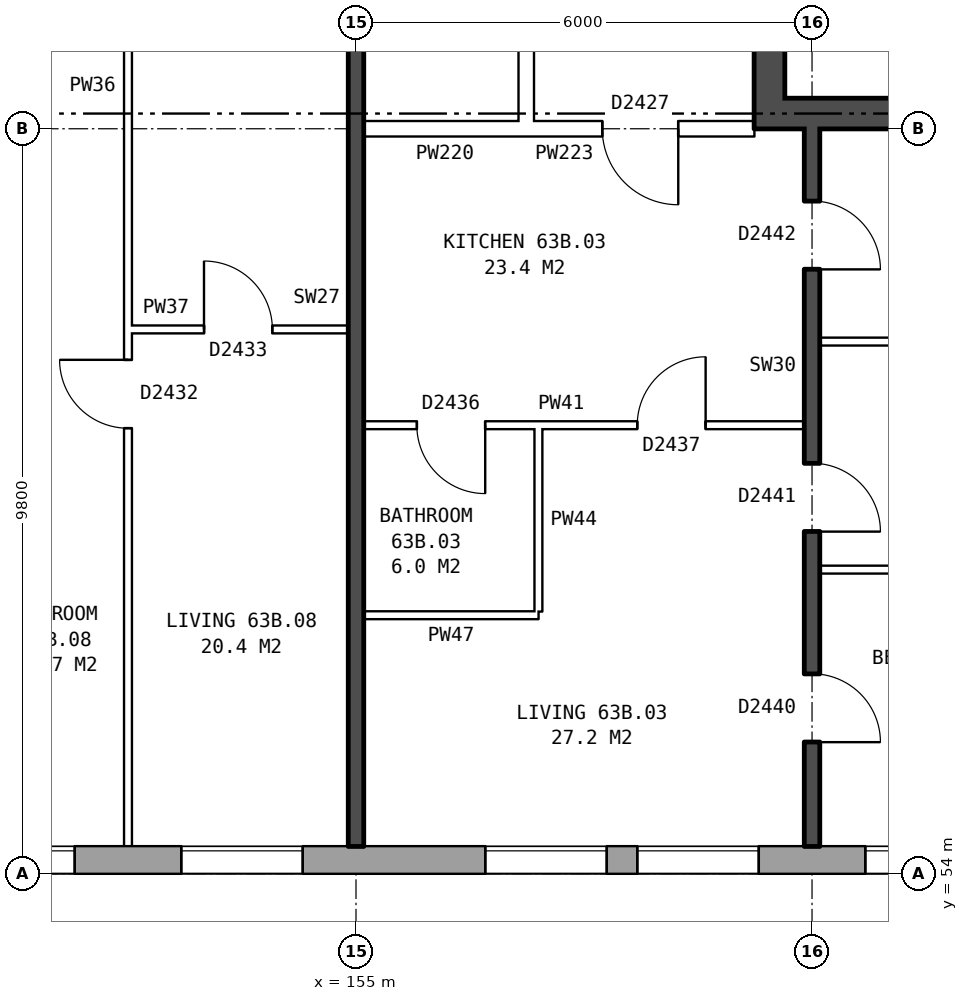
"""IFC4 building model, lengths in metres.
Left out: names, types, materials, properties, quantities, classifications, styles, units other than length and angle.
Written with IfcOpenShell. Run it as: python <this file> out.ifc"""

import sys

from ifc_helpers import new_model, si_unit, direction, frame, frame_2d, origin, place, context, subcontext, project, spatial, rectangle, extrude, element, fill, save


model = new_model("IFC4")
c1 = context("Model", 3, precision=1e-05, world=origin(), true_north=direction((0.0, 1.0)))
c2 = subcontext(c1, "Body", "Model", "MODEL_VIEW")
j1 = project(units=[si_unit("LENGTHUNIT", "METRE"), si_unit("PLANEANGLEUNIT", "RADIAN")], contexts=[c1])
p1 = place(None, origin())
s1 = spatial("IfcSite", under=j1, at=p1, CompositionType="ELEMENT")
p2 = place(p1, origin())
s2 = spatial("IfcBuilding", under=s1, at=p2, CompositionType="ELEMENT")
p3 = place(p2, frame((0.0, 0.0, 224.5)))
s3 = spatial("IfcBuildingStorey", under=s2, at=p3, CompositionType="ELEMENT", Elevation=224.5)
p4 = place(p3, frame((132.05, 54.18, 0.0), z_axis=(0.0, 0.0, 1.0), x_axis=(1.0, 0.0, 0.0)))
e1 = element("IfcWall", 1, at=p4, inside=s3, PredefinedType="STANDARD", context=c2, shape_type="SweptSolid", body=[
    extrude(rectangle(XDim=33.875, YDim=0.36, at=frame_2d((16.938, 0.0))), origin(), (0.0, 0.0, 1.0), 2.85),
])
p5 = place(p4, frame((2.65, 0.0, 0.8)))
e2 = element("IfcOpeningElement", 2, at=p5, cuts=e1, PredefinedType="OPENING", context=c2, shape_type="SweptSolid", body=[
    extrude(rectangle(XDim=1.6, YDim=1.8, at=frame_2d((0.8, 0.9))), frame((0.0, 0.19, 0.0), z_axis=(0.0, -1.0, 0.0), x_axis=(1.0, 0.0, 0.0)), (0.0, 0.0, 1.0), 0.38),
])
p6 = place(p4, frame((5.65, 0.0, 0.8)))
e3 = element("IfcOpeningElement", 3, at=p6, cuts=e1, PredefinedType="OPENING", context=c2, shape_type="SweptSolid", body=[
    extrude(rectangle(XDim=1.6, YDim=1.8, at=frame_2d((0.8, 0.9))), frame((0.0, 0.19, 0.0), z_axis=(0.0, -1.0, 0.0), x_axis=(1.0, 0.0, 0.0)), (0.0, 0.0, 1.0), 0.38),
])
p7 = place(p4, frame((8.65, 0.0, 0.8)))
e4 = element("IfcOpeningElement", 4, at=p7, cuts=e1, PredefinedType="OPENING", context=c2, shape_type="SweptSolid", body=[
    extrude(rectangle(XDim=1.6, YDim=1.8, at=frame_2d((0.8, 0.9))), frame((0.0, 0.19, 0.0), z_axis=(0.0, -1.0, 0.0), x_axis=(1.0, 0.0, 0.0)), (0.0, 0.0, 1.0), 0.38),
])
p8 = place(p4, frame((11.15, 0.0, 1.7)))
e5 = element("IfcOpeningElement", 5, at=p8, cuts=e1, PredefinedType="OPENING", context=c2, shape_type="SweptSolid", body=[
    extrude(rectangle(XDim=0.6, YDim=0.9, at=frame_2d((0.3, 0.45))), frame((0.0, 0.19, 0.0), z_axis=(0.0, -1.0, 0.0), x_axis=(1.0, 0.0, 0.0)), (0.0, 0.0, 1.0), 0.38),
])
p9 = place(p4, frame((14.65, 0.0, 0.8)))
e6 = element("IfcOpeningElement", 6, at=p9, cuts=e1, PredefinedType="OPENING", context=c2, shape_type="SweptSolid", body=[
    extrude(rectangle(XDim=1.6, YDim=1.8, at=frame_2d((0.8, 0.9))), frame((0.0, 0.19, 0.0), z_axis=(0.0, -1.0, 0.0), x_axis=(1.0, 0.0, 0.0)), (0.0, 0.0, 1.0), 0.38),
])
p10 = place(p4, frame((17.65, 0.0, 0.8)))
e7 = element("IfcOpeningElement", 7, at=p10, cuts=e1, PredefinedType="OPENING", context=c2, shape_type="SweptSolid", body=[
    extrude(rectangle(XDim=1.6, YDim=1.8, at=frame_2d((0.8, 0.9))), frame((0.0, 0.19, 0.0), z_axis=(0.0, -1.0, 0.0), x_axis=(1.0, 0.0, 0.0)), (0.0, 0.0, 1.0), 0.38),
])
p11 = place(p4, frame((20.65, 0.0, 0.8)))
e8 = element("IfcOpeningElement", 8, at=p11, cuts=e1, PredefinedType="OPENING", context=c2, shape_type="SweptSolid", body=[
    extrude(rectangle(XDim=1.6, YDim=1.8, at=frame_2d((0.8, 0.9))), frame((0.0, 0.19, 0.0), z_axis=(0.0, -1.0, 0.0), x_axis=(1.0, 0.0, 0.0)), (0.0, 0.0, 1.0), 0.38),
])
p12 = place(p4, frame((24.65, 0.0, 0.8)))
e9 = element("IfcOpeningElement", 9, at=p12, cuts=e1, PredefinedType="OPENING", context=c2, shape_type="SweptSolid", body=[
    extrude(rectangle(XDim=1.6, YDim=1.8, at=frame_2d((0.8, 0.9))), frame((0.0, 0.19, 0.0), z_axis=(0.0, -1.0, 0.0), x_axis=(1.0, 0.0, 0.0)), (0.0, 0.0, 1.0), 0.38),
])
p13 = place(p4, frame((26.65, 0.0, 0.8)))
e10 = element("IfcOpeningElement", 10, at=p13, cuts=e1, PredefinedType="OPENING", context=c2, shape_type="SweptSolid", body=[
    extrude(rectangle(XDim=1.6, YDim=1.8, at=frame_2d((0.8, 0.9))), frame((0.0, 0.19, 0.0), z_axis=(0.0, -1.0, 0.0), x_axis=(1.0, 0.0, 0.0)), (0.0, 0.0, 1.0), 0.38),
])
p14 = place(p4, frame((29.65, 0.0, 0.8)))
e11 = element("IfcOpeningElement", 11, at=p14, cuts=e1, PredefinedType="OPENING", context=c2, shape_type="SweptSolid", body=[
    extrude(rectangle(XDim=1.6, YDim=1.8, at=frame_2d((0.8, 0.9))), frame((0.0, 0.19, 0.0), z_axis=(0.0, -1.0, 0.0), x_axis=(1.0, 0.0, 0.0)), (0.0, 0.0, 1.0), 0.38),
])
p15 = place(p4, frame((13.2, 0.0, 0.8)))
e12 = element("IfcOpeningElement", 12, at=p15, cuts=e1, PredefinedType="OPENING", context=c2, shape_type="SweptSolid", body=[
    extrude(rectangle(XDim=0.6, YDim=1.5, at=frame_2d((0.3, 0.75))), frame((0.0, 0.19, 0.0), z_axis=(0.0, -1.0, 0.0), x_axis=(1.0, 0.0, 0.0)), (0.0, 0.0, 1.0), 0.38),
])
p16 = place(p3, frame((160.44, 76.2, 0.0), z_axis=(0.0, 0.0, 1.0), x_axis=(0.0, -1.0, 0.0)))
e13 = element("IfcWall", 13, at=p16, inside=s3, PredefinedType="SHEAR", context=c2, shape_type="SweptSolid", body=[
    extrude(rectangle(XDim=12.4, YDim=0.4, at=frame_2d((6.2, 0.0))), origin(), (0.0, 0.0, 1.0), 2.85),
])
p17 = place(p16, frame((1.325, 0.0, 0.0)))
e14 = element("IfcOpeningElement", 14, at=p17, cuts=e13, PredefinedType="OPENING", context=c2, shape_type="SweptSolid", body=[
    extrude(rectangle(XDim=1.1, YDim=2.1, at=frame_2d((0.55, 1.05))), frame((0.0, 0.21, 0.0), z_axis=(0.0, -1.0, 0.0), x_axis=(1.0, 0.0, 0.0)), (0.0, 0.0, 1.0), 0.42),
])
p18 = place(p16, frame((3.625, 0.0, 0.0)))
e15 = element("IfcOpeningElement", 15, at=p18, cuts=e13, PredefinedType="OPENING", context=c2, shape_type="SweptSolid", body=[
    extrude(rectangle(XDim=0.85, YDim=2.1, at=frame_2d((0.425, 1.05))), frame((0.0, 0.21, 0.0), z_axis=(0.0, -1.0, 0.0), x_axis=(1.0, 0.0, 0.0)), (0.0, 0.0, 1.0), 0.42),
])
p19 = place(p16, frame((5.775, 0.0, 0.0)))
e16 = element("IfcOpeningElement", 16, at=p19, cuts=e13, PredefinedType="OPENING", context=c2, shape_type="SweptSolid", body=[
    extrude(rectangle(XDim=0.85, YDim=2.1, at=frame_2d((0.425, 1.05))), frame((0.0, 0.21, 0.0), z_axis=(0.0, -1.0, 0.0), x_axis=(1.0, 0.0, 0.0)), (0.0, 0.0, 1.0), 0.42),
])
p20 = place(p16, frame((9.9, 0.0, 0.0)))
e17 = element("IfcOpeningElement", 17, at=p20, cuts=e13, PredefinedType="OPENING", context=c2, shape_type="SweptSolid", body=[
    extrude(rectangle(XDim=1.1, YDim=2.1, at=frame_2d((0.55, 1.05))), frame((0.0, 0.21, 0.0), z_axis=(0.0, -1.0, 0.0), x_axis=(1.0, 0.0, 0.0)), (0.0, 0.0, 1.0), 0.42),
])
p21 = place(p16, frame((8.125, 0.0, 0.0)))
e18 = element("IfcOpeningElement", 18, at=p21, cuts=e13, PredefinedType="OPENING", context=c2, shape_type="SweptSolid", body=[
    extrude(rectangle(XDim=0.85, YDim=2.1, at=frame_2d((0.425, 1.05))), frame((0.0, 0.21, 0.0), z_axis=(0.0, -1.0, 0.0), x_axis=(1.0, 0.0, 0.0)), (0.0, 0.0, 1.0), 0.42),
])
p22 = place(p3, frame((160.64, 64.0, 0.0), z_axis=(0.0, 0.0, 1.0), x_axis=(1.0, 0.0, 0.0)))
e19 = element("IfcWall", 19, at=p22, inside=s3, PredefinedType="SHEAR", context=c2, shape_type="SweptSolid", body=[
    extrude(rectangle(XDim=7.6, YDim=0.4, at=frame_2d((3.8, 0.0))), origin(), (0.0, 0.0, 1.0), 2.85),
])
p23 = place(p3, frame((157.24, 63.9, 0.0), z_axis=(0.0, 0.0, 1.0), x_axis=(0.0, 1.0, 0.0)))
e20 = element("IfcWall", 20, at=p23, inside=s3, PredefinedType="PARTITIONING", context=c2, shape_type="SweptSolid", body=[
    extrude(rectangle(XDim=12.2, YDim=0.2, at=frame_2d((6.1, 0.0))), origin(), (0.0, 0.0, 1.0), 2.85),
])
p24 = place(p23, frame((5.1, 0.0, 0.0)))
e21 = element("IfcOpeningElement", 21, at=p24, cuts=e20, PredefinedType="OPENING", context=c2, shape_type="SweptSolid", body=[
    extrude(rectangle(XDim=2.0, YDim=2.1, at=frame_2d((1.0, 1.05))), frame((0.0, 0.11, 0.0), z_axis=(0.0, -1.0, 0.0), x_axis=(1.0, 0.0, 0.0)), (0.0, 0.0, 1.0), 0.22),
])
p25 = place(p3, frame((155.1, 57.4, 0.0), z_axis=(0.0, 0.0, 1.0), x_axis=(1.0, 0.0, 0.0)))
e22 = element("IfcWall", 22, at=p25, inside=s3, PredefinedType="PARTITIONING", context=c2, shape_type="SweptSolid", body=[
    extrude(rectangle(XDim=2.3, YDim=0.1, at=frame_2d((1.15, 0.0))), origin(), (0.0, 0.0, 1.0), 2.85),
])
p26 = place(p3, frame((161.1, 58.0, 0.0), z_axis=(0.0, 0.0, 1.0), x_axis=(1.0, 0.0, 0.0)))
e23 = element("IfcWall", 23, at=p26, inside=s3, PredefinedType="PARTITIONING", context=c2, shape_type="SweptSolid", body=[
    extrude(rectangle(XDim=7.54, YDim=0.1, at=frame_2d((3.77, 0.0))), origin(), (0.0, 0.0, 1.0), 2.85),
])
p27 = place(p3, frame((155.1, 59.9, 0.0), z_axis=(0.0, 0.0, 1.0), x_axis=(1.0, 0.0, 0.0)))
e24 = element("IfcWall", 24, at=p27, inside=s3, PredefinedType="PARTITIONING", context=c2, shape_type="SweptSolid", body=[
    extrude(rectangle(XDim=5.8, YDim=0.1, at=frame_2d((2.9, 0.0))), origin(), (0.0, 0.0, 1.0), 2.85),
])
p28 = place(p27, frame((3.6, 0.0, 0.0)))
e25 = element("IfcOpeningElement", 25, at=p28, cuts=e24, PredefinedType="OPENING", context=c2, shape_type="SweptSolid", body=[
    extrude(rectangle(XDim=0.9, YDim=2.1, at=frame_2d((0.45, 1.05))), frame((0.0, 0.06, 0.0), z_axis=(0.0, -1.0, 0.0), x_axis=(1.0, 0.0, 0.0)), (0.0, 0.0, 1.0), 0.12),
])
p29 = place(p27, frame((0.7, 0.0, 0.0)))
e26 = element("IfcOpeningElement", 26, at=p29, cuts=e24, PredefinedType="OPENING", context=c2, shape_type="SweptSolid", body=[
    extrude(rectangle(XDim=0.9, YDim=2.1, at=frame_2d((0.45, 1.05))), frame((0.0, 0.06, 0.0), z_axis=(0.0, -1.0, 0.0), x_axis=(1.0, 0.0, 0.0)), (0.0, 0.0, 1.0), 0.12),
])
p30 = place(p3, frame((161.1, 61.0, 0.0), z_axis=(0.0, 0.0, 1.0), x_axis=(1.0, 0.0, 0.0)))
e27 = element("IfcWall", 27, at=p30, inside=s3, PredefinedType="PARTITIONING", context=c2, shape_type="SweptSolid", body=[
    extrude(rectangle(XDim=7.54, YDim=0.1, at=frame_2d((3.77, 0.0))), origin(), (0.0, 0.0, 1.0), 2.85),
])
p31 = place(p3, frame((152.0, 61.16, 0.0), z_axis=(0.0, 0.0, 1.0), x_axis=(1.0, 0.0, 0.0)))
e28 = element("IfcWall", 28, at=p31, inside=s3, PredefinedType="PARTITIONING", context=c2, shape_type="SweptSolid", body=[
    extrude(rectangle(XDim=2.9, YDim=0.1, at=frame_2d((1.45, 0.0))), origin(), (0.0, 0.0, 1.0), 2.85),
])
p32 = place(p31, frame((1.0, 0.0, 0.0)))
e29 = element("IfcOpeningElement", 29, at=p32, cuts=e28, PredefinedType="OPENING", context=c2, shape_type="SweptSolid", body=[
    extrude(rectangle(XDim=0.9, YDim=2.1, at=frame_2d((0.45, 1.05))), frame((0.0, 0.06, 0.0), z_axis=(0.0, -1.0, 0.0), x_axis=(1.0, 0.0, 0.0)), (0.0, 0.0, 1.0), 0.12),
])
p33 = place(p3, frame((155.1, 63.8, 0.0), z_axis=(0.0, 0.0, 1.0), x_axis=(1.0, 0.0, 0.0)))
e30 = element("IfcWall", 30, at=p33, inside=s3, PredefinedType="PARTITIONING", context=c2, shape_type="SweptSolid", body=[
    extrude(rectangle(XDim=2.14, YDim=0.2, at=frame_2d((1.07, 0.0))), origin(), (0.0, 0.0, 1.0), 2.85),
])
p34 = place(p3, frame((157.24, 63.8, 0.0), z_axis=(0.0, 0.0, 1.0), x_axis=(1.0, 0.0, 0.0)))
e31 = element("IfcWall", 31, at=p34, inside=s3, PredefinedType="PARTITIONING", context=c2, shape_type="SweptSolid", body=[
    extrude(rectangle(XDim=3.0, YDim=0.2, at=frame_2d((1.5, 0.0))), origin(), (0.0, 0.0, 1.0), 2.85),
])
p35 = place(p34, frame((1.0, 0.0, 0.0)))
e32 = element("IfcOpeningElement", 32, at=p35, cuts=e31, PredefinedType="OPENING", context=c2, shape_type="SweptSolid", body=[
    extrude(rectangle(XDim=1.0, YDim=2.1, at=frame_2d((0.5, 1.05))), frame((0.0, 0.11, 0.0), z_axis=(0.0, -1.0, 0.0), x_axis=(1.0, 0.0, 0.0)), (0.0, 0.0, 1.0), 0.22),
])
p36 = place(p3, frame((152.0, 54.36, 0.0), z_axis=(0.0, 0.0, 1.0), x_axis=(0.0, 1.0, 0.0)))
e33 = element("IfcWall", 33, at=p36, inside=s3, PredefinedType="PARTITIONING", context=c2, shape_type="SweptSolid", body=[
    extrude(rectangle(XDim=14.34, YDim=0.1, at=frame_2d((7.17, 0.0))), origin(), (0.0, 0.0, 1.0), 2.85),
])
p37 = place(p36, frame((5.5, 0.0, 0.0)))
e34 = element("IfcOpeningElement", 34, at=p37, cuts=e33, PredefinedType="OPENING", context=c2, shape_type="SweptSolid", body=[
    extrude(rectangle(XDim=0.9, YDim=2.1, at=frame_2d((0.45, 1.05))), frame((0.0, 0.06, 0.0), z_axis=(0.0, -1.0, 0.0), x_axis=(1.0, 0.0, 0.0)), (0.0, 0.0, 1.0), 0.12),
])
p38 = place(p36, frame((13.04, 0.0, 0.0)))
e35 = element("IfcOpeningElement", 35, at=p38, cuts=e33, PredefinedType="OPENING", context=c2, shape_type="SweptSolid", body=[
    extrude(rectangle(XDim=0.9, YDim=2.1, at=frame_2d((0.45, 1.05))), frame((0.0, 0.06, 0.0), z_axis=(0.0, -1.0, 0.0), x_axis=(1.0, 0.0, 0.0)), (0.0, 0.0, 1.0), 0.12),
])
p39 = place(p3, frame((155.0, 54.36, 0.0), z_axis=(0.0, 0.0, 1.0), x_axis=(0.0, 1.0, 0.0)))
e36 = element("IfcWall", 36, at=p39, inside=s3, PredefinedType="SOLIDWALL", context=c2, shape_type="SweptSolid", body=[
    extrude(rectangle(XDim=14.44, YDim=0.2, at=frame_2d((7.22, 0.0))), origin(), (0.0, 0.0, 1.0), 2.85),
])
p40 = place(p3, frame((157.4, 57.45, 0.0), z_axis=(0.0, 0.0, 1.0), x_axis=(0.0, 1.0, 0.0)))
e37 = element("IfcWall", 37, at=p40, inside=s3, PredefinedType="PARTITIONING", context=c2, shape_type="SweptSolid", body=[
    extrude(rectangle(XDim=2.4, YDim=0.1, at=frame_2d((1.2, 0.0))), origin(), (0.0, 0.0, 1.0), 2.85),
])
p41 = place(p3, frame((161.0, 54.36, 0.0), z_axis=(0.0, 0.0, 1.0), x_axis=(0.0, 1.0, 0.0)))
e38 = element("IfcWall", 38, at=p41, inside=s3, PredefinedType="SOLIDWALL", context=c2, shape_type="SweptSolid", body=[
    extrude(rectangle(XDim=9.44, YDim=0.2, at=frame_2d((4.72, 0.0))), origin(), (0.0, 0.0, 1.0), 2.85),
])
p42 = place(p41, frame((1.37, 0.0, 0.0)))
e39 = element("IfcOpeningElement", 39, at=p42, cuts=e38, PredefinedType="OPENING", context=c2, shape_type="SweptSolid", body=[
    extrude(rectangle(XDim=0.9, YDim=2.1, at=frame_2d((0.45, 1.05))), frame((0.0, 0.11, 0.0), z_axis=(0.0, -1.0, 0.0), x_axis=(1.0, 0.0, 0.0)), (0.0, 0.0, 1.0), 0.22),
])
p43 = place(p41, frame((4.14, 0.0, 0.0)))
e40 = element("IfcOpeningElement", 40, at=p43, cuts=e38, PredefinedType="OPENING", context=c2, shape_type="SweptSolid", body=[
    extrude(rectangle(XDim=0.9, YDim=2.1, at=frame_2d((0.45, 1.05))), frame((0.0, 0.11, 0.0), z_axis=(0.0, -1.0, 0.0), x_axis=(1.0, 0.0, 0.0)), (0.0, 0.0, 1.0), 0.22),
])
p44 = place(p41, frame((7.59, 0.0, 0.0)))
e41 = element("IfcOpeningElement", 41, at=p44, cuts=e38, PredefinedType="OPENING", context=c2, shape_type="SweptSolid", body=[
    extrude(rectangle(XDim=0.9, YDim=2.1, at=frame_2d((0.45, 1.05))), frame((0.0, 0.11, 0.0), z_axis=(0.0, -1.0, 0.0), x_axis=(1.0, 0.0, 0.0)), (0.0, 0.0, 1.0), 0.22),
])
p45 = place(p10, origin())
e42 = element("IfcWindow", 42, at=p45, inside=s3, PartitioningType="SINGLE_PANEL", PredefinedType="WINDOW", context=c2, shape_type="SweptSolid", body=[
    extrude(rectangle(XDim=1.6, YDim=1.8, at=frame_2d((0.8, 0.9))), frame((0.0, 0.15, 0.0), z_axis=(0.0, -1.0, 0.0), x_axis=(1.0, 0.0, 0.0)), (0.0, 0.0, 1.0), 0.06),
])
fill(e7, e42)
p46 = place(p11, origin())
e43 = element("IfcWindow", 43, at=p46, inside=s3, PartitioningType="SINGLE_PANEL", PredefinedType="WINDOW", context=c2, shape_type="SweptSolid", body=[
    extrude(rectangle(XDim=1.6, YDim=1.8, at=frame_2d((0.8, 0.9))), frame((0.0, 0.15, 0.0), z_axis=(0.0, -1.0, 0.0), x_axis=(1.0, 0.0, 0.0)), (0.0, 0.0, 1.0), 0.06),
])
fill(e8, e43)
p47 = place(p12, origin())
e44 = element("IfcWindow", 44, at=p47, inside=s3, PartitioningType="SINGLE_PANEL", PredefinedType="WINDOW", context=c2, shape_type="SweptSolid", body=[
    extrude(rectangle(XDim=1.6, YDim=1.8, at=frame_2d((0.8, 0.9))), frame((0.0, 0.15, 0.0), z_axis=(0.0, -1.0, 0.0), x_axis=(1.0, 0.0, 0.0)), (0.0, 0.0, 1.0), 0.06),
])
fill(e9, e44)
p48 = place(p13, origin())
e45 = element("IfcWindow", 45, at=p48, inside=s3, PartitioningType="SINGLE_PANEL", PredefinedType="WINDOW", context=c2, shape_type="SweptSolid", body=[
    extrude(rectangle(XDim=1.6, YDim=1.8, at=frame_2d((0.8, 0.9))), frame((0.0, 0.15, 0.0), z_axis=(0.0, -1.0, 0.0), x_axis=(1.0, 0.0, 0.0)), (0.0, 0.0, 1.0), 0.06),
])
fill(e10, e45)
p49 = place(p14, origin())
e46 = element("IfcWindow", 46, at=p49, inside=s3, PartitioningType="SINGLE_PANEL", PredefinedType="WINDOW", context=c2, shape_type="SweptSolid", body=[
    extrude(rectangle(XDim=1.6, YDim=1.8, at=frame_2d((0.8, 0.9))), frame((0.0, 0.15, 0.0), z_axis=(0.0, -1.0, 0.0), x_axis=(1.0, 0.0, 0.0)), (0.0, 0.0, 1.0), 0.06),
])
fill(e11, e46)
p50 = place(p42, frame((0.9, 0.0, 0.0), z_axis=(0.0, 0.0, 1.0), x_axis=(-1.0, 0.0, 0.0)))
e47 = element("IfcDoor", 47, at=p50, inside=s3, OperationType="SINGLE_SWING_RIGHT", PredefinedType="DOOR", context=c2, shape_type="SweptSolid", body=[
    extrude(rectangle(XDim=0.9, YDim=2.1, at=frame_2d((0.45, 1.05))), frame((0.0, 0.025, 0.0), z_axis=(0.0, -1.0, 0.0), x_axis=(1.0, 0.0, 0.0)), (0.0, 0.0, 1.0), 0.05),
])
fill(e39, e47)
p51 = place(p43, frame((0.9, 0.0, 0.0), z_axis=(0.0, 0.0, 1.0), x_axis=(-1.0, 0.0, 0.0)))
e48 = element("IfcDoor", 48, at=p51, inside=s3, OperationType="SINGLE_SWING_RIGHT", PredefinedType="DOOR", context=c2, shape_type="SweptSolid", body=[
    extrude(rectangle(XDim=0.9, YDim=2.1, at=frame_2d((0.45, 1.05))), frame((0.0, 0.025, 0.0), z_axis=(0.0, -1.0, 0.0), x_axis=(1.0, 0.0, 0.0)), (0.0, 0.0, 1.0), 0.05),
])
fill(e40, e48)
p52 = place(p44, frame((0.9, 0.0, 0.0), z_axis=(0.0, 0.0, 1.0), x_axis=(-1.0, 0.0, 0.0)))
e49 = element("IfcDoor", 49, at=p52, inside=s3, OperationType="SINGLE_SWING_RIGHT", PredefinedType="DOOR", context=c2, shape_type="SweptSolid", body=[
    extrude(rectangle(XDim=0.9, YDim=2.1, at=frame_2d((0.45, 1.05))), frame((0.0, 0.025, 0.0), z_axis=(0.0, -1.0, 0.0), x_axis=(1.0, 0.0, 0.0)), (0.0, 0.0, 1.0), 0.05),
])
fill(e41, e49)
p53 = place(p35, frame((1.0, 0.0, 0.0), z_axis=(0.0, 0.0, 1.0), x_axis=(-1.0, 0.0, 0.0)))
e50 = element("IfcDoor", 50, at=p53, inside=s3, OperationType="SINGLE_SWING_LEFT", PredefinedType="DOOR", context=c2, shape_type="SweptSolid", body=[
    extrude(rectangle(XDim=1.0, YDim=2.1, at=frame_2d((0.5, 1.05))), frame((0.0, 0.025, 0.0), z_axis=(0.0, -1.0, 0.0), x_axis=(1.0, 0.0, 0.0)), (0.0, 0.0, 1.0), 0.05),
])
fill(e32, e50)
p54 = place(p28, origin())
e51 = element("IfcDoor", 51, at=p54, inside=s3, OperationType="SINGLE_SWING_RIGHT", PredefinedType="DOOR", context=c2, shape_type="SweptSolid", body=[
    extrude(rectangle(XDim=0.9, YDim=2.1, at=frame_2d((0.45, 1.05))), frame((0.0, 0.025, 0.0), z_axis=(0.0, -1.0, 0.0), x_axis=(1.0, 0.0, 0.0)), (0.0, 0.0, 1.0), 0.05),
])
fill(e25, e51)
p55 = place(p29, frame((0.9, 0.0, 0.0), z_axis=(0.0, 0.0, 1.0), x_axis=(-1.0, 0.0, 0.0)))
e52 = element("IfcDoor", 52, at=p55, inside=s3, OperationType="SINGLE_SWING_LEFT", PredefinedType="DOOR", context=c2, shape_type="SweptSolid", body=[
    extrude(rectangle(XDim=0.9, YDim=2.1, at=frame_2d((0.45, 1.05))), frame((0.0, 0.025, 0.0), z_axis=(0.0, -1.0, 0.0), x_axis=(1.0, 0.0, 0.0)), (0.0, 0.0, 1.0), 0.05),
])
fill(e26, e52)
p56 = place(p37, origin())
e53 = element("IfcDoor", 53, at=p56, inside=s3, OperationType="SINGLE_SWING_RIGHT", PredefinedType="DOOR", context=c2, shape_type="SweptSolid", body=[
    extrude(rectangle(XDim=0.9, YDim=2.1, at=frame_2d((0.45, 1.05))), frame((0.0, 0.025, 0.0), z_axis=(0.0, -1.0, 0.0), x_axis=(1.0, 0.0, 0.0)), (0.0, 0.0, 1.0), 0.05),
])
fill(e34, e53)
p57 = place(p32, origin())
e54 = element("IfcDoor", 54, at=p57, inside=s3, OperationType="SINGLE_SWING_LEFT", PredefinedType="DOOR", context=c2, shape_type="SweptSolid", body=[
    extrude(rectangle(XDim=0.9, YDim=2.1, at=frame_2d((0.45, 1.05))), frame((0.0, 0.025, 0.0), z_axis=(0.0, -1.0, 0.0), x_axis=(1.0, 0.0, 0.0)), (0.0, 0.0, 1.0), 0.05),
])
fill(e29, e54)
save(model, sys.argv[1])
